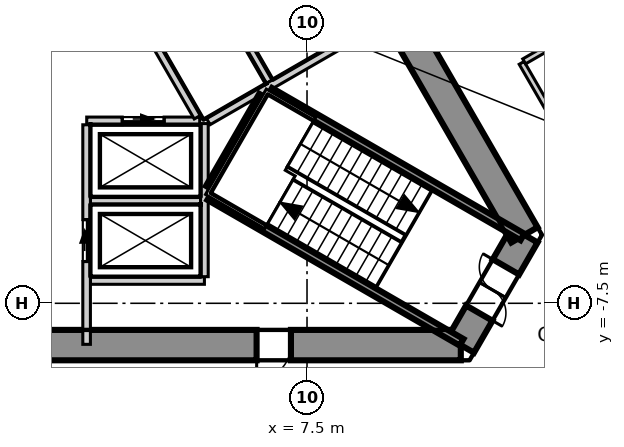
"""IFC4 building model, lengths in metres.
Left out: names, types, materials, properties, quantities, classifications, styles, units other than length and angle.
Written with IfcOpenShell. Run it as: python <this file> out.ifc"""

import sys

from ifc_helpers import new_model, si_unit, direction, frame, frame_2d, origin, place, context, subcontext, project, spatial, polyline, rectangle, outline, extrude, element, fill, save


model = new_model("IFC4")
c1 = context("Model", 3, precision=1e-05, world=origin(), true_north=direction((0.0, 1.0)))
c2 = subcontext(c1, "Body", "Model", "MODEL_VIEW")
j1 = project(units=[si_unit("LENGTHUNIT", "METRE"), si_unit("PLANEANGLEUNIT", "RADIAN")], contexts=[c1])
p1 = place(None, origin())
s1 = spatial("IfcSite", under=j1, at=p1, CompositionType="ELEMENT")
p2 = place(p1, origin())
s2 = spatial("IfcBuilding", under=s1, at=p2, CompositionType="ELEMENT")
p3 = place(p2, frame((0.0, 0.0, 140.3)))
s3 = spatial("IfcBuildingStorey", under=s2, at=p3, CompositionType="ELEMENT", Elevation=140.3)
p4 = place(p3, frame((-11.547, -8.6, -0.3), z_axis=(0.0, 0.0, 1.0), x_axis=(1.0, 0.0, 0.0)))
e1 = element("IfcWall", 1, at=p4, inside=s3, PredefinedType="SHEAR", context=c2, shape_type="SweptSolid", body=[
    extrude(outline(polyline([(-0.231, -0.4), (1.732, -0.4), (3.695, -0.4), (5.658, -0.4), (7.621, -0.4), (9.584, -0.4), (11.547, -0.4), (13.51, -0.4), (15.473, -0.4), (17.436, -0.4), (19.399, -0.4), (21.362, -0.4), (23.325, -0.4), (22.863, 0.4), (20.977, 0.4), (19.091, 0.4), (17.205, 0.4), (15.319, 0.4), (13.433, 0.4), (11.547, 0.4), (9.661, 0.4), (7.775, 0.4), (5.889, 0.4), (4.003, 0.4), (2.117, 0.4), (0.231, 0.4), (-0.231, -0.4)])), origin(), (0.0, 0.0, 1.0), 4.0),
])
p5 = place(p4, frame((4.612, 0.0, 0.3)))
e2 = element("IfcOpeningElement", 2, at=p5, cuts=e1, PredefinedType="OPENING", context=c2, shape_type="SweptSolid", body=[
    extrude(rectangle(XDim=1.0, YDim=2.1, at=frame_2d((0.5, 1.05))), frame((0.0, 0.41, 0.0), z_axis=(0.0, -1.0, 0.0), x_axis=(1.0, 0.0, 0.0)), (0.0, 0.0, 1.0), 0.82),
])
p6 = place(p4, frame((17.722, 0.0, 0.3)))
e3 = element("IfcOpeningElement", 3, at=p6, cuts=e1, PredefinedType="OPENING", context=c2, shape_type="SweptSolid", body=[
    extrude(rectangle(XDim=0.9, YDim=2.1, at=frame_2d((0.45, 1.05))), frame((0.0, 0.41, 0.0), z_axis=(0.0, -1.0, 0.0), x_axis=(1.0, 0.0, 0.0)), (0.0, 0.0, 1.0), 0.82),
])
p7 = place(p3, frame((11.547, -8.6, -0.3), z_axis=(0.0, 0.0, 1.0), x_axis=(0.49987182685, 0.866099391942, 0.0)))
e4 = element("IfcWall", 4, at=p7, inside=s3, PredefinedType="SHEAR", context=c2, shape_type="SweptSolid", body=[
    extrude(outline(polyline([(-0.231, -0.4), (1.674, -0.4), (3.579, -0.4), (3.118, 0.4), (1.674, 0.4), (0.231, 0.4), (-0.231, -0.4)])), origin(), (0.0, 0.0, 1.0), 4.0),
])
p8 = place(p7, frame((0.974, 0.0, 0.3)))
e5 = element("IfcOpeningElement", 5, at=p8, cuts=e4, PredefinedType="OPENING", context=c2, shape_type="SweptSolid", body=[
    extrude(rectangle(XDim=1.4, YDim=2.1, at=frame_2d((0.7, 1.05))), frame((0.0, 0.41, 0.0), z_axis=(0.0, -1.0, 0.0), x_axis=(1.0, 0.0, 0.0)), (0.0, 0.0, 1.0), 0.82),
])
p9 = place(p3, frame((13.221, -5.7, -0.3), z_axis=(0.0, 0.0, 1.0), x_axis=(-0.499995765644, 0.866027848477, 0.0)))
e6 = element("IfcWall", 6, at=p9, inside=s3, PredefinedType="SHEAR", context=c2, shape_type="SweptSolid", body=[
    extrude(outline(polyline([(-0.231, -0.4), (1.732, -0.4), (3.695, -0.4), (5.658, -0.4), (7.621, -0.4), (9.584, -0.4), (11.547, -0.4), (13.51, -0.4), (15.473, -0.4), (17.436, -0.4), (19.399, -0.4), (21.362, -0.4), (23.325, -0.4), (22.863, 0.4), (20.977, 0.4), (19.091, 0.4), (17.205, 0.4), (15.319, 0.4), (13.433, 0.4), (11.547, 0.4), (9.661, 0.4), (7.775, 0.4), (5.889, 0.4), (4.003, 0.4), (2.117, 0.4), (0.231, 0.4), (-0.231, -0.4)])), origin(), (0.0, 0.0, 1.0), 4.0),
])
p10 = place(p9, frame((10.647, 0.0, 0.3)))
e7 = element("IfcOpeningElement", 7, at=p10, cuts=e6, PredefinedType="OPENING", context=c2, shape_type="SweptSolid", body=[
    extrude(rectangle(XDim=1.8, YDim=2.1, at=frame_2d((0.9, 1.05))), frame((0.0, 0.41, 0.0), z_axis=(0.0, -1.0, 0.0), x_axis=(1.0, 0.0, 0.0)), (0.0, 0.0, 1.0), 0.82),
])
p11 = place(p9, frame((17.721, 0.0, 0.3)))
e8 = element("IfcOpeningElement", 8, at=p11, cuts=e6, PredefinedType="OPENING", context=c2, shape_type="SweptSolid", body=[
    extrude(rectangle(XDim=0.9, YDim=2.1, at=frame_2d((0.45, 1.05))), frame((0.0, 0.41, 0.0), z_axis=(0.0, -1.0, 0.0), x_axis=(1.0, 0.0, 0.0)), (0.0, 0.0, 1.0), 0.82),
])
p12 = place(p3, frame((31.126, -14.433, 0.0), z_axis=(0.0, 0.0, 1.0), x_axis=(-0.500008098571, 0.866020728022, 0.0)))
e9 = element("IfcWall", 9, at=p12, inside=s3, PredefinedType="ELEMENTEDWALL", context=c2, shape_type="SweptSolid", body=[
    extrude(rectangle(XDim=56.105, YDim=0.2, at=frame_2d((28.052, 0.0))), origin(), (0.0, 0.0, 1.0), 3.7),
])
p13 = place(p12, frame((2.198, 0.0, 0.9)))
e10 = element("IfcOpeningElement", 10, at=p13, cuts=e9, PredefinedType="OPENING", context=c2, shape_type="SweptSolid", body=[
    extrude(rectangle(XDim=4.9, YDim=2.5, at=frame_2d((2.45, 1.25))), frame((0.0, 0.11, 0.0), z_axis=(0.0, -1.0, 0.0), x_axis=(1.0, 0.0, 0.0)), (0.0, 0.0, 1.0), 0.22),
])
p14 = place(p12, frame((8.888, 0.0, 0.9)))
e11 = element("IfcOpeningElement", 11, at=p14, cuts=e9, PredefinedType="OPENING", context=c2, shape_type="SweptSolid", body=[
    extrude(rectangle(XDim=4.9, YDim=2.5, at=frame_2d((2.45, 1.25))), frame((0.0, 0.11, 0.0), z_axis=(0.0, -1.0, 0.0), x_axis=(1.0, 0.0, 0.0)), (0.0, 0.0, 1.0), 0.22),
])
p15 = place(p12, frame((15.578, 0.0, 0.9)))
e12 = element("IfcOpeningElement", 12, at=p15, cuts=e9, PredefinedType="OPENING", context=c2, shape_type="SweptSolid", body=[
    extrude(rectangle(XDim=4.9, YDim=2.5, at=frame_2d((2.45, 1.25))), frame((0.0, 0.11, 0.0), z_axis=(0.0, -1.0, 0.0), x_axis=(1.0, 0.0, 0.0)), (0.0, 0.0, 1.0), 0.22),
])
p16 = place(p12, frame((22.267, 0.0, 0.9)))
e13 = element("IfcOpeningElement", 13, at=p16, cuts=e9, PredefinedType="OPENING", context=c2, shape_type="SweptSolid", body=[
    extrude(rectangle(XDim=4.9, YDim=2.5, at=frame_2d((2.45, 1.25))), frame((0.0, 0.11, 0.0), z_axis=(0.0, -1.0, 0.0), x_axis=(1.0, 0.0, 0.0)), (0.0, 0.0, 1.0), 0.22),
])
p17 = place(p12, frame((28.957, 0.0, 0.9)))
e14 = element("IfcOpeningElement", 14, at=p17, cuts=e9, PredefinedType="OPENING", context=c2, shape_type="SweptSolid", body=[
    extrude(rectangle(XDim=4.9, YDim=2.5, at=frame_2d((2.45, 1.25))), frame((0.0, 0.11, 0.0), z_axis=(0.0, -1.0, 0.0), x_axis=(1.0, 0.0, 0.0)), (0.0, 0.0, 1.0), 0.22),
])
p18 = place(p12, frame((35.647, 0.0, 0.9)))
e15 = element("IfcOpeningElement", 15, at=p18, cuts=e9, PredefinedType="OPENING", context=c2, shape_type="SweptSolid", body=[
    extrude(rectangle(XDim=4.9, YDim=2.5, at=frame_2d((2.45, 1.25))), frame((0.0, 0.11, 0.0), z_axis=(0.0, -1.0, 0.0), x_axis=(1.0, 0.0, 0.0)), (0.0, 0.0, 1.0), 0.22),
])
p19 = place(p12, frame((42.337, 0.0, 0.9)))
e16 = element("IfcOpeningElement", 16, at=p19, cuts=e9, PredefinedType="OPENING", context=c2, shape_type="SweptSolid", body=[
    extrude(rectangle(XDim=4.9, YDim=2.5, at=frame_2d((2.45, 1.25))), frame((0.0, 0.11, 0.0), z_axis=(0.0, -1.0, 0.0), x_axis=(1.0, 0.0, 0.0)), (0.0, 0.0, 1.0), 0.22),
])
p20 = place(p12, frame((49.027, 0.0, 0.9)))
e17 = element("IfcOpeningElement", 17, at=p20, cuts=e9, PredefinedType="OPENING", context=c2, shape_type="SweptSolid", body=[
    extrude(rectangle(XDim=4.9, YDim=2.5, at=frame_2d((2.45, 1.25))), frame((0.0, 0.11, 0.0), z_axis=(0.0, -1.0, 0.0), x_axis=(1.0, 0.0, 0.0)), (0.0, 0.0, 1.0), 0.22),
])
p21 = place(p3, frame((13.148, -1.174, 0.0), z_axis=(0.0, 0.0, 1.0), x_axis=(0.500088017957, -0.865974580629, 0.0)))
e18 = element("IfcWall", 18, at=p21, inside=s3, PredefinedType="PARTITIONING", context=c2, shape_type="SweptSolid", body=[
    extrude(rectangle(XDim=10.964, YDim=0.15, at=frame_2d((5.482, 0.0))), origin(), (0.0, 0.0, 1.0), 3.7),
])
p22 = place(p21, frame((4.964, 0.0, 0.0)))
e19 = element("IfcOpeningElement", 19, at=p22, cuts=e18, PredefinedType="OPENING", context=c2, shape_type="SweptSolid", body=[
    extrude(rectangle(XDim=1.1, YDim=2.1, at=frame_2d((0.55, 1.05))), frame((0.0, 0.085, 0.0), z_axis=(0.0, -1.0, 0.0), x_axis=(1.0, 0.0, 0.0)), (0.0, 0.0, 1.0), 0.17),
])
p23 = place(p3, frame((13.214, -1.135, 0.0), z_axis=(0.0, 0.0, 1.0), x_axis=(0.865940524948, 0.500146985649, 0.0)))
e20 = element("IfcWall", 20, at=p23, inside=s3, PredefinedType="PARTITIONING", context=c2, shape_type="SweptSolid", body=[
    extrude(rectangle(XDim=4.049, YDim=0.15, at=frame_2d((2.024, 0.0))), origin(), (0.0, 0.0, 1.0), 3.7),
])
p24 = place(p3, frame((1.8, -4.8, 0.0), z_axis=(0.0, 0.0, 1.0), x_axis=(1.0, 0.0, 0.0)))
e21 = element("IfcWall", 21, at=p24, inside=s3, PredefinedType="SOLIDWALL", context=c2, shape_type="SweptSolid", body=[
    extrude(rectangle(XDim=2.9, YDim=0.2, at=frame_2d((1.45, 0.0))), origin(), (0.0, 0.0, 1.0), 3.7),
])
p25 = place(p3, frame((1.8, -6.9, 0.0), z_axis=(0.0, 0.0, 1.0), x_axis=(1.0, 0.0, 0.0)))
e22 = element("IfcWall", 22, at=p25, inside=s3, PredefinedType="SOLIDWALL", context=c2, shape_type="SweptSolid", body=[
    extrude(rectangle(XDim=3.0, YDim=0.2, at=frame_2d((1.5, 0.0))), origin(), (0.0, 0.0, 1.0), 3.7),
])
p26 = place(p3, frame((1.703, -2.7, 0.0), z_axis=(0.0, 0.0, 1.0), x_axis=(1.0, 0.0, 0.0)))
e23 = element("IfcWall", 23, at=p26, inside=s3, PredefinedType="SOLIDWALL", context=c2, shape_type="SweptSolid", body=[
    extrude(rectangle(XDim=2.973, YDim=0.2, at=frame_2d((1.487, 0.0))), origin(), (0.0, 0.0, 1.0), 3.7),
])
p27 = place(p26, frame((0.936, 0.0, 0.0)))
e24 = element("IfcOpeningElement", 24, at=p27, cuts=e23, PredefinedType="OPENING", context=c2, shape_type="SweptSolid", body=[
    extrude(rectangle(XDim=1.1, YDim=2.1, at=frame_2d((0.55, 1.05))), frame((0.0, 0.11, 0.0), z_axis=(0.0, -1.0, 0.0), x_axis=(1.0, 0.0, 0.0)), (0.0, 0.0, 1.0), 0.22),
])
p28 = place(p3, frame((3.19, -0.125, 0.0), z_axis=(0.0, 0.0, 1.0), x_axis=(0.499988658015, -0.866031951983, 0.0)))
e25 = element("IfcWall", 25, at=p28, inside=s3, PredefinedType="SOLIDWALL", context=c2, shape_type="SweptSolid", body=[
    extrude(rectangle(XDim=2.858, YDim=0.2, at=frame_2d((1.429, 0.0))), origin(), (0.0, 0.0, 1.0), 3.7),
])
p29 = place(p3, frame((1.7, -8.58, 0.0), z_axis=(0.0, 0.0, 1.0), x_axis=(0.0, 1.0, 0.0)))
e26 = element("IfcWall", 26, at=p29, inside=s3, PredefinedType="SOLIDWALL", context=c2, shape_type="SweptSolid", body=[
    extrude(rectangle(XDim=5.777, YDim=0.2, at=frame_2d((2.889, 0.0))), origin(), (0.0, 0.0, 1.0), 3.7),
])
p30 = place(p29, frame((2.18, 0.0, 0.0)))
e27 = element("IfcOpeningElement", 27, at=p30, cuts=e26, PredefinedType="OPENING", context=c2, shape_type="SweptSolid", body=[
    extrude(rectangle(XDim=1.1, YDim=2.1, at=frame_2d((0.55, 1.05))), frame((0.0, 0.11, 0.0), z_axis=(0.0, -1.0, 0.0), x_axis=(1.0, 0.0, 0.0)), (0.0, 0.0, 1.0), 0.22),
])
p31 = place(p3, frame((4.8, -6.8, 0.0), z_axis=(0.0, 0.0, 1.0), x_axis=(0.0, 1.0, 0.0)))
e28 = element("IfcWall", 28, at=p31, inside=s3, PredefinedType="SOLIDWALL", context=c2, shape_type="SweptSolid", body=[
    extrude(rectangle(XDim=4.029, YDim=0.2, at=frame_2d((2.015, 0.0))), origin(), (0.0, 0.0, 1.0), 3.7),
])
p32 = place(p3, frame((5.057, 0.841, 0.0), z_axis=(0.0, 0.0, 1.0), x_axis=(0.50012328804, -0.865954211699, 0.0)))
e29 = element("IfcWall", 29, at=p32, inside=s3, PredefinedType="SOLIDWALL", context=c2, shape_type="SweptSolid", body=[
    extrude(rectangle(XDim=2.9, YDim=0.2, at=frame_2d((1.45, 0.0))), origin(), (0.0, 0.0, 1.0), 3.7),
])
p33 = place(p3, frame((4.9, -2.714, 0.0), z_axis=(0.0, 0.0, 1.0), x_axis=(0.865992350556, 0.500057245502, 0.0)))
e30 = element("IfcWall", 30, at=p33, inside=s3, PredefinedType="SOLIDWALL", context=c2, shape_type="SweptSolid", body=[
    extrude(rectangle(XDim=3.914, YDim=0.2, at=frame_2d((1.957, 0.0))), origin(), (0.0, 0.0, 1.0), 3.7),
])
p34 = place(p3, frame((4.929, -4.693, 0.0), z_axis=(0.0, 0.0, 1.0), x_axis=(0.866005769735, -0.50003400563, 0.0)))
e31 = element("IfcWall", 31, at=p34, inside=s3, PredefinedType="SOLIDWALL", context=c2, shape_type="SweptSolid", body=[
    extrude(rectangle(XDim=7.665, YDim=0.2, at=frame_2d((3.833, 0.0))), origin(), (0.0, 0.0, 1.0), 3.7),
])
p35 = place(p3, frame((4.929, -4.462, 0.0), z_axis=(0.0, 0.0, 1.0), x_axis=(0.500200581029, 0.865909567298, 0.0)))
e32 = element("IfcWall", 32, at=p35, inside=s3, PredefinedType="SOLIDWALL", context=c2, shape_type="SweptSolid", body=[
    extrude(rectangle(XDim=2.799, YDim=0.2, at=frame_2d((1.399, 0.0))), origin(), (0.0, 0.0, 1.0), 3.7),
])
p36 = place(p3, frame((6.529, -1.922, 0.0), z_axis=(0.0, 0.0, 1.0), x_axis=(0.866060938598, -0.499938446846, 0.0)))
e33 = element("IfcWall", 33, at=p36, inside=s3, PredefinedType="SOLIDWALL", context=c2, shape_type="SweptSolid", body=[
    extrude(rectangle(XDim=7.665, YDim=0.2, at=frame_2d((3.832, 0.0))), origin(), (0.0, 0.0, 1.0), 3.7),
])
p37 = place(p27, origin())
e34 = element("IfcDoor", 34, at=p37, inside=s3, OperationType="SLIDING_TO_LEFT", PredefinedType="DOOR", context=c2, shape_type="SweptSolid", body=[
    extrude(rectangle(XDim=1.1, YDim=2.1, at=frame_2d((0.55, 1.05))), frame((0.0, 0.025, 0.0), z_axis=(0.0, -1.0, 0.0), x_axis=(1.0, 0.0, 0.0)), (0.0, 0.0, 1.0), 0.05),
])
fill(e24, e34)
p38 = place(p30, origin())
e35 = element("IfcDoor", 35, at=p38, inside=s3, OperationType="SLIDING_TO_LEFT", PredefinedType="DOOR", context=c2, shape_type="SweptSolid", body=[
    extrude(rectangle(XDim=1.1, YDim=2.1, at=frame_2d((0.55, 1.05))), frame((0.0, 0.025, 0.0), z_axis=(0.0, -1.0, 0.0), x_axis=(1.0, 0.0, 0.0)), (0.0, 0.0, 1.0), 0.05),
])
fill(e27, e35)
p39 = place(p8, origin())
e36 = element("IfcDoor", 36, at=p39, inside=s3, OperationType="DOUBLE_DOOR_SINGLE_SWING", PredefinedType="DOOR", context=c2, shape_type="SweptSolid", body=[
    extrude(rectangle(XDim=1.4, YDim=2.1, at=frame_2d((0.7, 1.05))), frame((0.0, 0.025, 0.0), z_axis=(0.0, -1.0, 0.0), x_axis=(1.0, 0.0, 0.0)), (0.0, 0.0, 1.0), 0.05),
])
fill(e5, e36)
p40 = place(p6, origin())
e37 = element("IfcDoor", 37, at=p40, inside=s3, OperationType="SINGLE_SWING_LEFT", PredefinedType="DOOR", context=c2, shape_type="SweptSolid", body=[
    extrude(rectangle(XDim=0.9, YDim=2.1, at=frame_2d((0.45, 1.05))), frame((0.0, 0.025, 0.0), z_axis=(0.0, -1.0, 0.0), x_axis=(1.0, 0.0, 0.0)), (0.0, 0.0, 1.0), 0.05),
])
fill(e3, e37)
save(model, sys.argv[1])
